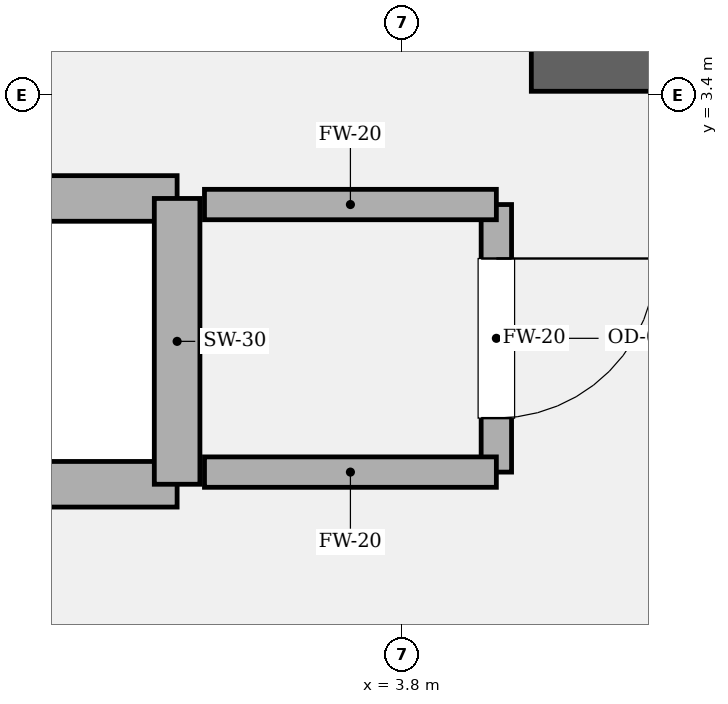
"""IFC4 building model, lengths in metres.
Left out: names, types, materials, properties, quantities, classifications, styles, units other than length and angle.
Written with IfcOpenShell. Run it as: python <this file> out.ifc"""

import sys

from ifc_helpers import new_model, si_unit, direction, frame, frame_2d, origin, place, context, subcontext, project, spatial, rectangle, extrude, element, fill, save


model = new_model("IFC4")
c1 = context("Model", 3, precision=1e-05, world=origin(), true_north=direction((0.0, 1.0)))
c2 = subcontext(c1, "Body", "Model", "MODEL_VIEW")
j1 = project(units=[si_unit("LENGTHUNIT", "METRE"), si_unit("PLANEANGLEUNIT", "RADIAN")], contexts=[c1])
p1 = place(None, origin())
s1 = spatial("IfcSite", under=j1, at=p1, CompositionType="ELEMENT")
p2 = place(p1, origin())
s2 = spatial("IfcBuilding", under=s1, at=p2, CompositionType="ELEMENT")
p3 = place(p2, frame((0.0, 0.0, 255.45)))
s3 = spatial("IfcBuildingStorey", under=s2, at=p3, CompositionType="ELEMENT", Elevation=255.45)
p4 = place(p3, frame((4.65, 3.6, 0.0), z_axis=(0.0, 0.0, 1.0), x_axis=(1.0, 0.0, 0.0)))
e1 = element("IfcWall", 1, at=p4, inside=s3, PredefinedType="SOLIDWALL", context=c2, shape_type="SweptSolid", body=[
    extrude(rectangle(XDim=5.275, YDim=0.35, at=frame_2d((2.638, 0.0))), origin(), (0.0, 0.0, 1.0), 4.05),
])
for number, where, z_axis, x_axis in (
    (2, (-2.32, 0.84, 0.0), (0.0, 0.0, 1.0), (1.0, 0.0, 0.0)),
    (3, (-2.32, 2.72, 0.0), (0.0, 0.0, 1.0), (1.0, 0.0, 0.0)),
):
    element("IfcWall", number, at=place(p3, frame(where, z_axis=z_axis, x_axis=x_axis)), inside=s3, PredefinedType="SOLIDWALL", context=c2, shape_type="SweptSolid", body=[
        extrude(rectangle(XDim=4.64, YDim=0.3, at=frame_2d((2.32, 0.0))), origin(), (0.0, 0.0, 1.0), 3.85),
    ])
p5 = place(p3, frame((2.32, 0.84, 0.0), z_axis=(0.0, 0.0, 1.0), x_axis=(0.0, 1.0, 0.0)))
e4 = element("IfcWall", 4, at=p5, inside=s3, PredefinedType="SOLIDWALL", context=c2, shape_type="SweptSolid", body=[
    extrude(rectangle(XDim=1.88, YDim=0.3, at=frame_2d((0.94, 0.0))), origin(), (0.0, 0.0, 1.0), 3.85),
])
p6 = place(p3, frame((4.42, 0.92, 0.0), z_axis=(0.0, 0.0, 1.0), x_axis=(0.0, 1.0, 0.0)))
e5 = element("IfcWall", 5, at=p6, inside=s3, PredefinedType="SOLIDWALL", context=c2, shape_type="SweptSolid", body=[
    extrude(rectangle(XDim=1.76, YDim=0.2, at=frame_2d((0.88, 0.0))), origin(), (0.0, 0.0, 1.0), 3.85),
])
p7 = place(p6, frame((0.355, 0.0, 0.0)))
e6 = element("IfcOpeningElement", 6, at=p7, cuts=e5, PredefinedType="OPENING", context=c2, shape_type="SweptSolid", body=[
    extrude(rectangle(XDim=1.05, YDim=2.2, at=frame_2d((0.525, 1.1))), frame((0.0, 0.11, 0.0), z_axis=(0.0, -1.0, 0.0), x_axis=(1.0, 0.0, 0.0)), (0.0, 0.0, 1.0), 0.22),
])
for number, where, z_axis, x_axis in (
    (7, (4.42, 2.68, 0.0), (0.0, 0.0, 1.0), (-1.0, 0.0, 0.0)),
    (8, (2.5, 0.92, 0.0), (0.0, 0.0, 1.0), (1.0, 0.0, 0.0)),
):
    element("IfcWall", number, at=place(p3, frame(where, z_axis=z_axis, x_axis=x_axis)), inside=s3, PredefinedType="SOLIDWALL", context=c2, shape_type="SweptSolid", body=[
        extrude(rectangle(XDim=1.92, YDim=0.2, at=frame_2d((0.96, 0.0))), origin(), (0.0, 0.0, 1.0), 3.85),
    ])
p8 = place(p7, origin())
e9 = element("IfcDoor", 9, at=p8, inside=s3, OperationType="SINGLE_SWING_RIGHT", PredefinedType="DOOR", context=c2, shape_type="SweptSolid", body=[
    extrude(rectangle(XDim=1.05, YDim=2.2, at=frame_2d((0.525, 1.1))), frame((0.0, 0.025, 0.0), z_axis=(0.0, -1.0, 0.0), x_axis=(1.0, 0.0, 0.0)), (0.0, 0.0, 1.0), 0.05),
])
fill(e6, e9)
save(model, sys.argv[1])
